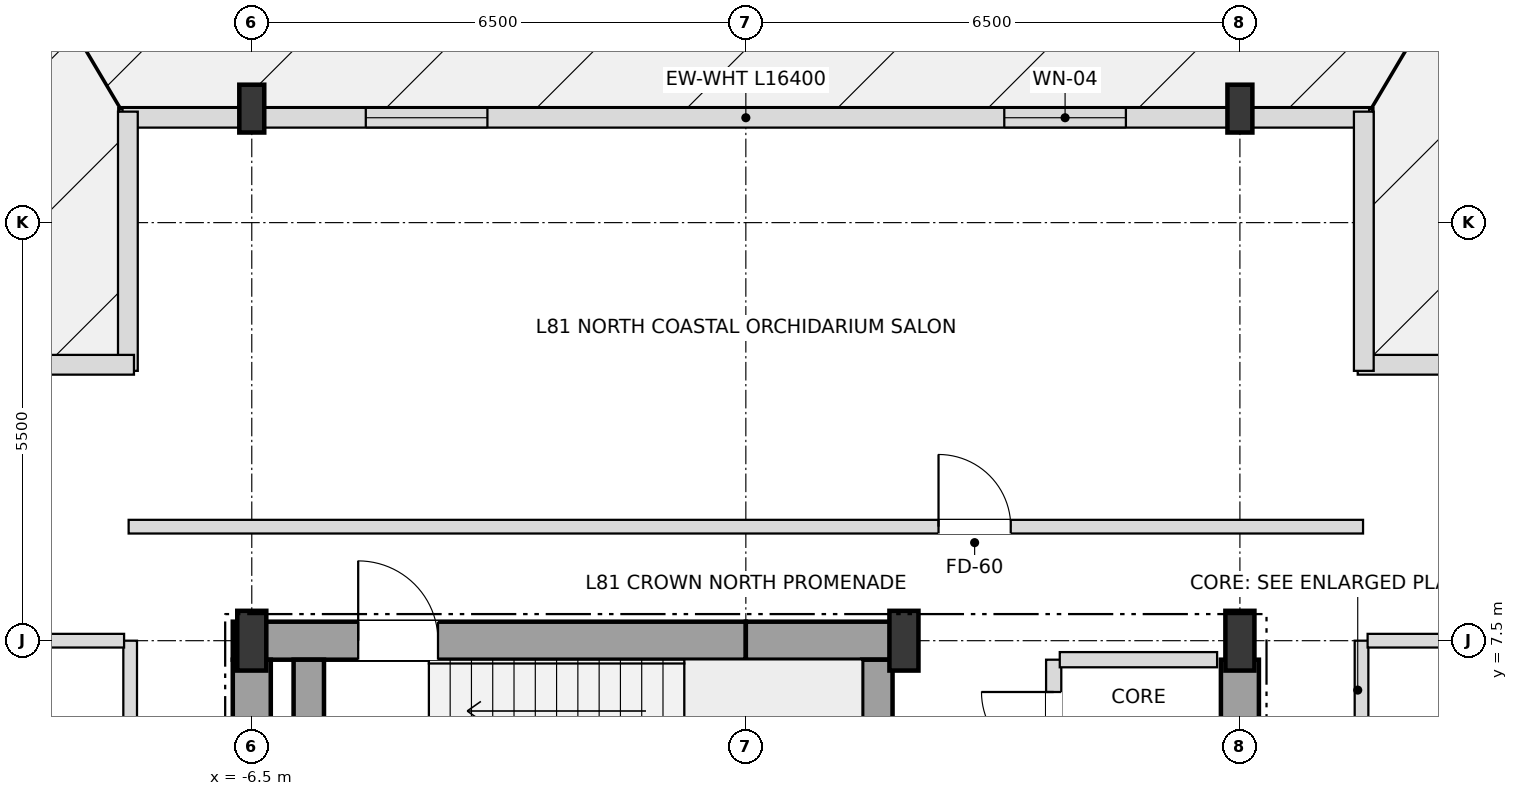
"""IFC4 building model, lengths in metres.
Left out: names, types, materials, properties, quantities, classifications, styles, units other than length and angle.
Written with IfcOpenShell. Run it as: python <this file> out.ifc"""

import sys

from ifc_helpers import new_model, si_unit, direction, frame, frame_2d, origin, origin_2d, place, context, subcontext, project, spatial, rectangle, i_section, extrude, element, fill, save


model = new_model("IFC4")
c1 = context("Model", 3, precision=1e-05, world=origin(), true_north=direction((0.0, 1.0)))
c2 = subcontext(c1, "Body", "Model", "MODEL_VIEW")
j1 = project(units=[si_unit("LENGTHUNIT", "METRE"), si_unit("PLANEANGLEUNIT", "RADIAN")], contexts=[c1])
p1 = place(None, origin())
s1 = spatial("IfcSite", under=j1, at=p1, CompositionType="ELEMENT")
p2 = place(p1, origin())
s2 = spatial("IfcBuilding", under=s1, at=p2, CompositionType="ELEMENT")
p3 = place(p2, frame((0.0, 0.0, 309.9)))
s3 = spatial("IfcBuildingStorey", under=s2, at=p3, CompositionType="ELEMENT", Elevation=309.9)
for number, where, z_axis, x_axis in (
    (1, (-6.5, 7.5, 0.0), (0.0, 0.0, 1.0), (1.0, 0.0, 0.0)),
    (2, (2.08, 7.5, 0.0), (0.0, 0.0, 1.0), (1.0, 0.0, 0.0)),
    (3, (6.5, 7.5, 0.0), (0.0, 0.0, 1.0), (1.0, 0.0, 0.0)),
):
    element("IfcColumn", number, at=place(p3, frame(where, z_axis=z_axis, x_axis=x_axis)), inside=s3, PredefinedType="COLUMN", context=c2, shape_type="SweptSolid", body=[
        extrude(i_section(OverallWidth=0.382, OverallDepth=0.786, WebThickness=0.02, FlangeThickness=0.033, at=origin_2d()), origin(), (0.0, 0.0, 1.0), 4.5),
    ])
for number, where, z_axis, x_axis in (
    (4, (-6.5, 14.5, 0.0), (0.0, 0.0, 1.0), (1.0, 0.0, 0.0)),
    (5, (6.5, 14.5, 0.0), (0.0, 0.0, 1.0), (1.0, 0.0, 0.0)),
):
    element("IfcColumn", number, at=place(p3, frame(where, z_axis=z_axis, x_axis=x_axis)), inside=s3, PredefinedType="COLUMN", context=c2, shape_type="SweptSolid", body=[
        extrude(i_section(OverallWidth=0.328, OverallDepth=0.629, WebThickness=0.014, FlangeThickness=0.021, at=origin_2d()), origin(), (0.0, 0.0, 1.0), 4.5),
    ])
p4 = place(p3, frame((8.2, 14.38, 0.0), z_axis=(0.0, 0.0, 1.0), x_axis=(-1.0, 0.0, 0.0)))
e6 = element("IfcWall", 6, at=p4, inside=s3, PredefinedType="SOLIDWALL", context=c2, shape_type="SweptSolid", body=[
    extrude(rectangle(XDim=16.4, YDim=0.26, at=frame_2d((8.2, 0.0))), origin(), (0.0, 0.0, 1.0), 3.918),
])
p5 = place(p4, frame((3.2, 0.0, 0.9)))
e7 = element("IfcOpeningElement", 7, at=p5, cuts=e6, PredefinedType="OPENING", context=c2, shape_type="SweptSolid", body=[
    extrude(rectangle(XDim=1.6, YDim=2.0, at=frame_2d((0.8, 1.0))), frame((0.0, 0.14, 0.0), z_axis=(0.0, -1.0, 0.0), x_axis=(1.0, 0.0, 0.0)), (0.0, 0.0, 1.0), 0.28),
])
p6 = place(p4, frame((11.6, 0.0, 0.9)))
e8 = element("IfcOpeningElement", 8, at=p6, cuts=e6, PredefinedType="OPENING", context=c2, shape_type="SweptSolid", body=[
    extrude(rectangle(XDim=1.6, YDim=2.0, at=frame_2d((0.8, 1.0))), frame((0.0, 0.14, 0.0), z_axis=(0.0, -1.0, 0.0), x_axis=(1.0, 0.0, 0.0)), (0.0, 0.0, 1.0), 0.28),
])
for number, where, z_axis, x_axis in (
    (9, (11.46, 11.13, 0.0), (0.0, 0.0, 1.0), (-1.0, 0.0, 0.0)),
    (10, (8.13, 11.05, 0.0), (0.0, 0.0, 1.0), (0.0, 1.0, 0.0)),
    (11, (-8.13, 14.46, 0.0), (0.0, 0.0, 1.0), (0.0, -1.0, 0.0)),
    (12, (-8.05, 11.13, 0.0), (0.0, 0.0, 1.0), (-1.0, 0.0, 0.0)),
):
    element("IfcWall", number, at=place(p3, frame(where, z_axis=z_axis, x_axis=x_axis)), inside=s3, PredefinedType="SOLIDWALL", context=c2, shape_type="SweptSolid", body=[
        extrude(rectangle(XDim=3.41, YDim=0.26, at=frame_2d((1.705, 0.0))), origin(), (0.0, 0.0, 1.0), 4.25),
    ])
p7 = place(p3, frame((-6.75, 7.5, 0.0), z_axis=(0.0, 0.0, 1.0), x_axis=(1.0, 0.0, 0.0)))
e13 = element("IfcWall", 13, at=p7, inside=s3, PredefinedType="SHEAR", context=c2, shape_type="SweptSolid", body=[
    extrude(rectangle(XDim=6.75, YDim=0.5, at=frame_2d((3.375, 0.0))), origin(), (0.0, 0.0, 1.0), 4.25),
])
p8 = place(p7, frame((1.65, 0.0, 0.0)))
e14 = element("IfcOpeningElement", 14, at=p8, cuts=e13, PredefinedType="OPENING", context=c2, shape_type="SweptSolid", body=[
    extrude(rectangle(XDim=1.05, YDim=2.15, at=frame_2d((0.525, 1.075))), frame((0.0, 0.26, 0.0), z_axis=(0.0, -1.0, 0.0), x_axis=(1.0, 0.0, 0.0)), (0.0, 0.0, 1.0), 0.52),
])
p9 = place(p3, frame((0.0, 7.5, 0.0), z_axis=(0.0, 0.0, 1.0), x_axis=(1.0, 0.0, 0.0)))
e15 = element("IfcWall", 15, at=p9, inside=s3, PredefinedType="SHEAR", context=c2, shape_type="SweptSolid", body=[
    extrude(rectangle(XDim=2.08, YDim=0.5, at=frame_2d((1.04, 0.0))), origin(), (0.0, 0.0, 1.0), 4.25),
])
for number, where, z_axis, x_axis in (
    (16, (-6.5, 3.95, 0.0), (0.0, 0.0, 1.0), (0.0, 1.0, 0.0)),
    (17, (6.5, 3.95, 0.0), (0.0, 0.0, 1.0), (0.0, 1.0, 0.0)),
):
    element("IfcWall", number, at=place(p3, frame(where, z_axis=z_axis, x_axis=x_axis)), inside=s3, PredefinedType="SHEAR", context=c2, shape_type="SweptSolid", body=[
        extrude(rectangle(XDim=3.3, YDim=0.5, at=frame_2d((1.65, 0.0))), origin(), (0.0, 0.0, 1.0), 4.25),
    ])
for number, where, z_axis, x_axis in (
    (18, (1.73, 3.95, 0.0), (0.0, 0.0, 1.0), (0.0, 1.0, 0.0)),
    (19, (-5.75, 3.95, 0.0), (0.0, 0.0, 1.0), (0.0, 1.0, 0.0)),
):
    element("IfcWall", number, at=place(p3, frame(where, z_axis=z_axis, x_axis=x_axis)), inside=s3, PredefinedType="SHEAR", context=c2, shape_type="SweptSolid", body=[
        extrude(rectangle(XDim=3.3, YDim=0.4, at=frame_2d((1.65, 0.0))), origin(), (0.0, 0.0, 1.0), 4.25),
    ])
p10 = place(p3, frame((-8.1, -7.5, 0.0), z_axis=(0.0, 0.0, 1.0), x_axis=(0.0, 1.0, 0.0)))
e20 = element("IfcWall", 20, at=p10, inside=s3, PredefinedType="PARTITIONING", context=c2, shape_type="SweptSolid", body=[
    extrude(rectangle(XDim=15.0, YDim=0.18, at=frame_2d((7.5, 0.0))), origin(), (0.0, 0.0, 1.0), 4.25),
])
p11 = place(p10, frame((4.525, 0.0, 0.0)))
e21 = element("IfcOpeningElement", 21, at=p11, cuts=e20, PredefinedType="OPENING", context=c2, shape_type="SweptSolid", body=[
    extrude(rectangle(XDim=0.95, YDim=2.15, at=frame_2d((0.475, 1.075))), frame((0.0, 0.1, 0.0), z_axis=(0.0, -1.0, 0.0), x_axis=(1.0, 0.0, 0.0)), (0.0, 0.0, 1.0), 0.2),
])
p12 = place(p3, frame((4.05, 5.55, 0.0), z_axis=(0.0, 0.0, 1.0), x_axis=(0.0, 1.0, 0.0)))
e22 = element("IfcWall", 22, at=p12, inside=s3, PredefinedType="SOLIDWALL", context=c2, shape_type="SweptSolid", body=[
    extrude(rectangle(XDim=1.7, YDim=0.2, at=frame_2d((0.85, 0.0))), origin(), (0.0, 0.0, 1.0), 4.25),
])
p13 = place(p12, frame((0.325, 0.0, 0.0)))
e23 = element("IfcOpeningElement", 23, at=p13, cuts=e22, PredefinedType="OPENING", context=c2, shape_type="SweptSolid", body=[
    extrude(rectangle(XDim=0.95, YDim=2.15, at=frame_2d((0.475, 1.075))), frame((0.0, 0.11, 0.0), z_axis=(0.0, -1.0, 0.0), x_axis=(1.0, 0.0, 0.0)), (0.0, 0.0, 1.0), 0.22),
])
p14 = place(p3, frame((8.1, -7.5, 0.0), z_axis=(0.0, 0.0, 1.0), x_axis=(0.0, 1.0, 0.0)))
e24 = element("IfcWall", 24, at=p14, inside=s3, PredefinedType="PARTITIONING", context=c2, shape_type="SweptSolid", body=[
    extrude(rectangle(XDim=15.0, YDim=0.18, at=frame_2d((7.5, 0.0))), origin(), (0.0, 0.0, 1.0), 4.25),
])
p15 = place(p14, frame((4.525, 0.0, 0.0)))
e25 = element("IfcOpeningElement", 25, at=p15, cuts=e24, PredefinedType="OPENING", context=c2, shape_type="SweptSolid", body=[
    extrude(rectangle(XDim=0.95, YDim=2.15, at=frame_2d((0.475, 1.075))), frame((0.0, 0.1, 0.0), z_axis=(0.0, -1.0, 0.0), x_axis=(1.0, 0.0, 0.0)), (0.0, 0.0, 1.0), 0.2),
])
p16 = place(p14, frame((11.825, 0.0, 0.0)))
e26 = element("IfcOpeningElement", 26, at=p16, cuts=e24, PredefinedType="OPENING", context=c2, shape_type="SweptSolid", body=[
    extrude(rectangle(XDim=0.95, YDim=2.15, at=frame_2d((0.475, 1.075))), frame((0.0, 0.1, 0.0), z_axis=(0.0, -1.0, 0.0), x_axis=(1.0, 0.0, 0.0)), (0.0, 0.0, 1.0), 0.2),
])
p17 = place(p3, frame((4.13, 7.25, 0.0), z_axis=(0.0, 0.0, 1.0), x_axis=(1.0, 0.0, 0.0)))
e27 = element("IfcWall", 27, at=p17, inside=s3, PredefinedType="SOLIDWALL", context=c2, shape_type="SweptSolid", body=[
    extrude(rectangle(XDim=2.07, YDim=0.2, at=frame_2d((1.035, 0.0))), origin(), (0.0, 0.0, 1.0), 4.25),
])
for number, where, z_axis, x_axis in (
    (28, (-11.245, 7.5, 0.0), (0.0, 0.0, 1.0), (1.0, 0.0, 0.0)),
    (29, (8.18, 7.5, 0.0), (0.0, 0.0, 1.0), (1.0, 0.0, 0.0)),
):
    element("IfcWall", number, at=place(p3, frame(where, z_axis=z_axis, x_axis=x_axis)), inside=s3, PredefinedType="PARTITIONING", context=c2, shape_type="SweptSolid", body=[
        extrude(rectangle(XDim=3.065, YDim=0.18, at=frame_2d((1.533, 0.0))), origin(), (0.0, 0.0, 1.0), 3.918),
    ])
p18 = place(p3, frame((-8.12, 9.0, 0.0), z_axis=(0.0, 0.0, 1.0), x_axis=(1.0, 0.0, 0.0)))
e30 = element("IfcWall", 30, at=p18, inside=s3, PredefinedType="PARTITIONING", context=c2, shape_type="SweptSolid", body=[
    extrude(rectangle(XDim=16.24, YDim=0.18, at=frame_2d((8.12, 0.0))), origin(), (0.0, 0.0, 1.0), 4.25),
])
p19 = place(p18, frame((10.655, 0.0, 0.0)))
e31 = element("IfcOpeningElement", 31, at=p19, cuts=e30, PredefinedType="OPENING", context=c2, shape_type="SweptSolid", body=[
    extrude(rectangle(XDim=0.95, YDim=2.15, at=frame_2d((0.475, 1.075))), frame((0.0, 0.1, 0.0), z_axis=(0.0, -1.0, 0.0), x_axis=(1.0, 0.0, 0.0)), (0.0, 0.0, 1.0), 0.2),
])
p20 = place(p5, origin())
e32 = element("IfcWindow", 32, at=p20, inside=s3, PartitioningType="SINGLE_PANEL", PredefinedType="WINDOW", context=c2, shape_type="SweptSolid", body=[
    extrude(rectangle(XDim=1.6, YDim=2.0, at=frame_2d((0.8, 1.0))), frame((0.0, 0.03, 0.0), z_axis=(0.0, -1.0, 0.0), x_axis=(1.0, 0.0, 0.0)), (0.0, 0.0, 1.0), 0.06),
])
fill(e7, e32)
p21 = place(p6, origin())
e33 = element("IfcWindow", 33, at=p21, inside=s3, PartitioningType="SINGLE_PANEL", PredefinedType="WINDOW", context=c2, shape_type="SweptSolid", body=[
    extrude(rectangle(XDim=1.6, YDim=2.0, at=frame_2d((0.8, 1.0))), frame((0.0, 0.03, 0.0), z_axis=(0.0, -1.0, 0.0), x_axis=(1.0, 0.0, 0.0)), (0.0, 0.0, 1.0), 0.06),
])
fill(e8, e33)
p22 = place(p8, origin())
e34 = element("IfcDoor", 34, at=p22, inside=s3, OperationType="SINGLE_SWING_LEFT", PredefinedType="DOOR", context=c2, shape_type="SweptSolid", body=[
    extrude(rectangle(XDim=1.05, YDim=2.15, at=frame_2d((0.525, 1.075))), frame((0.0, 0.025, 0.0), z_axis=(0.0, -1.0, 0.0), x_axis=(1.0, 0.0, 0.0)), (0.0, 0.0, 1.0), 0.05),
])
fill(e14, e34)
p23 = place(p13, origin())
e35 = element("IfcDoor", 35, at=p23, inside=s3, OperationType="SINGLE_SWING_RIGHT", PredefinedType="DOOR", context=c2, shape_type="SweptSolid", body=[
    extrude(rectangle(XDim=0.95, YDim=2.15, at=frame_2d((0.475, 1.075))), frame((0.0, 0.025, 0.0), z_axis=(0.0, -1.0, 0.0), x_axis=(1.0, 0.0, 0.0)), (0.0, 0.0, 1.0), 0.05),
])
fill(e23, e35)
p24 = place(p19, origin())
e36 = element("IfcDoor", 36, at=p24, inside=s3, OperationType="SINGLE_SWING_LEFT", PredefinedType="DOOR", context=c2, shape_type="SweptSolid", body=[
    extrude(rectangle(XDim=0.95, YDim=2.15, at=frame_2d((0.475, 1.075))), frame((0.0, 0.025, 0.0), z_axis=(0.0, -1.0, 0.0), x_axis=(1.0, 0.0, 0.0)), (0.0, 0.0, 1.0), 0.05),
])
fill(e31, e36)
save(model, sys.argv[1])
